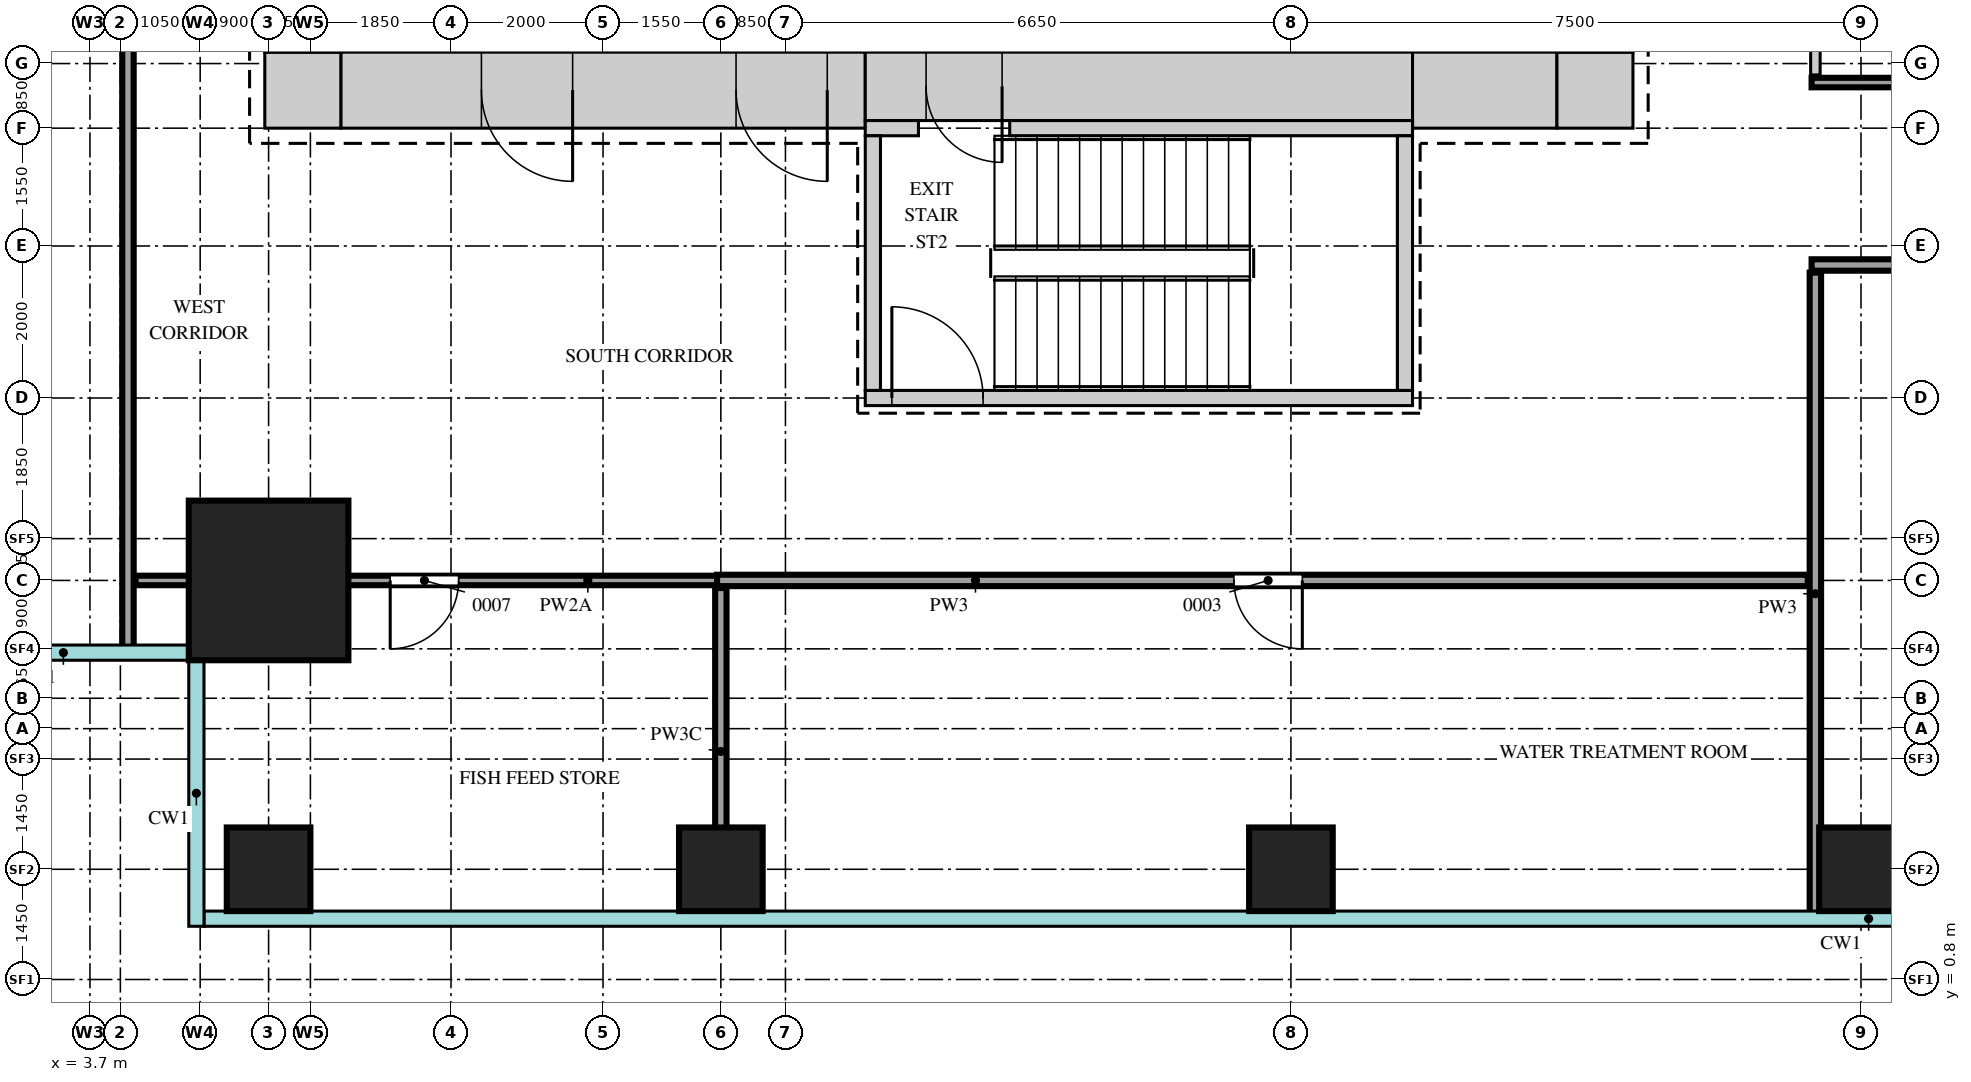
"""IFC4 building model, lengths in metres.
Left out: names, types, materials, properties, quantities, classifications, styles, units other than length and angle.
Written with IfcOpenShell. Run it as: python <this file> out.ifc"""

import sys

from ifc_helpers import new_model, si_unit, direction, frame, frame_2d, origin, origin_2d, place, context, subcontext, project, spatial, rectangle, extrude, source, transform, mapped, element, fill, save


model = new_model("IFC4")
c1 = context("Model", 3, precision=1e-05, world=origin(), true_north=direction((0.0, 1.0)))
c2 = subcontext(c1, "Body", "Model", "MODEL_VIEW")
j1 = project(units=[si_unit("LENGTHUNIT", "METRE"), si_unit("PLANEANGLEUNIT", "RADIAN")], contexts=[c1])
p1 = place(None, origin())
s1 = spatial("IfcSite", under=j1, at=p1, CompositionType="ELEMENT")
p2 = place(p1, origin())
s2 = spatial("IfcBuilding", under=s1, at=p2, CompositionType="ELEMENT")
p3 = place(p2, frame((0.0, 0.0, 145.5)))
s3 = spatial("IfcBuildingStorey", under=s2, at=p3, CompositionType="ELEMENT", Elevation=145.5)
m1 = source(origin(), c2, "Body", "SweptSolid", [
    extrude(rectangle(XDim=6.9, YDim=1.0, at=frame_2d((3.45, 0.0))), origin(), (0.0, 0.0, 1.0), 4.1),
])
p4 = place(p3, frame((7.0, 12.5, 0.0), z_axis=(0.0, 0.0, 1.0), x_axis=(1.0, 0.0, 0.0)))
e1 = element("IfcWall", 1, at=p4, inside=s3, PredefinedType="SHEAR", context=c2, shape_type="MappedRepresentation", body=[
    mapped(m1, transform((0.0, 0.0, 0.0))),
])
m2 = source(origin(), c2, "Body", "SweptSolid", [
    extrude(rectangle(XDim=1.2, YDim=2.1, at=frame_2d((0.6, 1.05))), frame((0.0, 0.51, 0.0), z_axis=(0.0, -1.0, 0.0), x_axis=(1.0, 0.0, 0.0)), (0.0, 0.0, 1.0), 1.02),
])
p5 = place(p4, frame((5.2, 0.0, 0.0)))
e2 = element("IfcOpeningElement", 2, at=p5, cuts=e1, PredefinedType="OPENING", context=c2, shape_type="MappedRepresentation", body=[
    mapped(m2, transform((0.0, 0.0, 0.0))),
])
p6 = place(p4, frame((1.85, 0.0, 0.0)))
e3 = element("IfcOpeningElement", 3, at=p6, cuts=e1, PredefinedType="OPENING", context=c2, shape_type="MappedRepresentation", body=[
    mapped(m2, transform((0.0, 0.0, 0.0))),
])
m3 = source(origin(), c2, "Body", "SweptSolid", [
    extrude(rectangle(XDim=7.2, YDim=0.9, at=frame_2d((3.6, 0.0))), origin(), (0.0, 0.0, 1.0), 4.1),
])
p7 = place(p3, frame((13.9, 12.55, 0.0), z_axis=(0.0, 0.0, 1.0), x_axis=(1.0, 0.0, 0.0)))
e4 = element("IfcWall", 4, at=p7, inside=s3, PredefinedType="SHEAR", context=c2, shape_type="MappedRepresentation", body=[
    mapped(m3, transform((0.0, 0.0, 0.0))),
])
m4 = source(origin(), c2, "Body", "SweptSolid", [
    extrude(rectangle(XDim=1.0, YDim=2.1, at=frame_2d((0.5, 1.05))), frame((0.0, 0.46, 0.0), z_axis=(0.0, -1.0, 0.0), x_axis=(1.0, 0.0, 0.0)), (0.0, 0.0, 1.0), 0.92),
])
p8 = place(p7, frame((0.8, 0.0, 0.0)))
e5 = element("IfcOpeningElement", 5, at=p8, cuts=e4, PredefinedType="OPENING", context=c2, shape_type="MappedRepresentation", body=[
    mapped(m4, transform((0.0, 0.0, 0.0))),
])
m5 = source(origin(), c2, "Body", "SweptSolid", [
    extrude(rectangle(XDim=1.9, YDim=1.0, at=frame_2d((0.95, 0.0))), origin(), (0.0, 0.0, 1.0), 4.1),
])
p9 = place(p3, frame((21.1, 12.5, 0.0), z_axis=(0.0, 0.0, 1.0), x_axis=(1.0, 0.0, 0.0)))
e6 = element("IfcWall", 6, at=p9, inside=s3, PredefinedType="SHEAR", context=c2, shape_type="MappedRepresentation", body=[
    mapped(m5, transform((0.0, 0.0, 0.0))),
])
m6 = source(origin(), c2, "Body", "SweptSolid", [
    extrude(rectangle(XDim=1.0, YDim=1.0, at=frame_2d((0.5, 0.0))), origin(), (0.0, 0.0, 1.0), 4.1),
])
for number, where, z_axis, x_axis in (
    (7, (23.0, 12.5, 0.0), (0.0, 0.0, 1.0), (1.0, 0.0, 0.0)),
    (8, (6.0, 12.5, 0.0), (0.0, 0.0, 1.0), (1.0, 0.0, 0.0)),
):
    element("IfcWall", number, at=place(p3, frame(where, z_axis=z_axis, x_axis=x_axis)), inside=s3, PredefinedType="SHEAR", context=c2, shape_type="MappedRepresentation", body=[
        mapped(m6, transform((0.0, 0.0, 0.0))),
    ])
m7 = source(origin(), c2, "Body", "SweptSolid", [
    extrude(rectangle(XDim=0.7, YDim=0.2, at=frame_2d((0.35, 0.0))), origin(), (0.0, 0.0, 1.0), 4.1),
])
p10 = place(p3, frame((13.9, 12.0, 0.0), z_axis=(0.0, 0.0, 1.0), x_axis=(1.0, 0.0, 0.0)))
e9 = element("IfcWall", 9, at=p10, inside=s3, PredefinedType="SHEAR", context=c2, shape_type="MappedRepresentation", body=[
    mapped(m7, transform((0.0, 0.0, 0.0))),
])
m8 = source(origin(), c2, "Body", "SweptSolid", [
    extrude(rectangle(XDim=5.3, YDim=0.2, at=frame_2d((2.65, 0.0))), origin(), (0.0, 0.0, 1.0), 4.1),
])
p11 = place(p3, frame((15.8, 12.0, 0.0), z_axis=(0.0, 0.0, 1.0), x_axis=(1.0, 0.0, 0.0)))
e10 = element("IfcWall", 10, at=p11, inside=s3, PredefinedType="SHEAR", context=c2, shape_type="MappedRepresentation", body=[
    mapped(m8, transform((0.0, 0.0, 0.0))),
])
m9 = source(origin(), c2, "Body", "SweptSolid", [
    extrude(rectangle(XDim=7.2, YDim=0.2, at=frame_2d((3.6, 0.0))), origin(), (0.0, 0.0, 1.0), 4.1),
])
p12 = place(p3, frame((13.9, 8.45, 0.0), z_axis=(0.0, 0.0, 1.0), x_axis=(1.0, 0.0, 0.0)))
e11 = element("IfcWall", 11, at=p12, inside=s3, PredefinedType="SHEAR", context=c2, shape_type="MappedRepresentation", body=[
    mapped(m9, transform((0.0, 0.0, 0.0))),
])
m10 = source(origin(), c2, "Body", "SweptSolid", [
    extrude(rectangle(XDim=1.2, YDim=2.1, at=frame_2d((0.6, 1.05))), frame((0.0, 0.11, 0.0), z_axis=(0.0, -1.0, 0.0), x_axis=(1.0, 0.0, 0.0)), (0.0, 0.0, 1.0), 0.22),
])
p13 = place(p12, frame((0.35, 0.0, 0.0)))
e12 = element("IfcOpeningElement", 12, at=p13, cuts=e11, PredefinedType="OPENING", context=c2, shape_type="MappedRepresentation", body=[
    mapped(m10, transform((0.0, 0.0, 0.0))),
])
m11 = source(origin(), c2, "Body", "SweptSolid", [
    extrude(rectangle(XDim=3.35, YDim=0.2, at=frame_2d((1.675, 0.0))), origin(), (0.0, 0.0, 1.0), 4.1),
])
for number, where, z_axis, x_axis in (
    (13, (21.0, 8.55, 0.0), (0.0, 0.0, 1.0), (0.0, 1.0, 0.0)),
    (14, (14.0, 8.55, 0.0), (0.0, 0.0, 1.0), (0.0, 1.0, 0.0)),
):
    element("IfcWall", number, at=place(p3, frame(where, z_axis=z_axis, x_axis=x_axis)), inside=s3, PredefinedType="SHEAR", context=c2, shape_type="MappedRepresentation", body=[
        mapped(m11, transform((0.0, 0.0, 0.0))),
    ])
m12 = source(origin(), c2, "Body", "SweptSolid", [
    extrude(rectangle(XDim=2.1, YDim=2.1, at=origin_2d()), origin(), (0.0, 0.0, 1.0), 4.4),
])
p14 = place(p3, frame((6.05, 6.05, 0.0), z_axis=(0.0, 0.0, 1.0), x_axis=(1.0, 0.0, 0.0)))
e15 = element("IfcColumn", 15, at=p14, inside=s3, PredefinedType="COLUMN", context=c2, shape_type="MappedRepresentation", body=[
    mapped(m12, transform((0.0, 0.0, 0.0))),
])
m13 = source(origin(), c2, "Body", "SweptSolid", [
    extrude(rectangle(XDim=1.1, YDim=1.1, at=origin_2d()), origin(), (0.0, 0.0, 1.0), 4.1),
])
for number, where, z_axis, x_axis in (
    (16, (6.05, 2.25, 0.0), (0.0, 0.0, 1.0), (1.0, 0.0, 0.0)),
    (17, (12.0, 2.25, 0.0), (0.0, 0.0, 1.0), (1.0, 0.0, 0.0)),
    (18, (19.5, 2.25, 0.0), (0.0, 0.0, 1.0), (1.0, 0.0, 0.0)),
    (19, (27.0, 2.25, 0.0), (0.0, 0.0, 1.0), (1.0, 0.0, 0.0)),
):
    element("IfcColumn", number, at=place(p3, frame(where, z_axis=z_axis, x_axis=x_axis)), inside=s3, PredefinedType="COLUMN", context=c2, shape_type="MappedRepresentation", body=[
        mapped(m13, transform((0.0, 0.0, 0.0))),
    ])
m14 = source(origin(), c2, "Body", "SweptSolid", [
    extrude(rectangle(XDim=4.3, YDim=0.15, at=frame_2d((2.15, 0.0))), origin(), (0.0, 0.0, 1.0), 3.65),
])
p15 = place(p3, frame((12.0, 1.65, 0.0), z_axis=(0.0, 0.0, 1.0), x_axis=(0.0, 1.0, 0.0)))
e20 = element("IfcWall", 20, at=p15, inside=s3, PredefinedType="PARTITIONING", context=c2, shape_type="MappedRepresentation", body=[
    mapped(m14, transform((0.0, 0.0, 0.0))),
])
m15 = source(origin(), c2, "Body", "SweptSolid", [
    extrude(rectangle(XDim=8.45, YDim=0.15, at=frame_2d((4.225, 0.0))), origin(), (0.0, 0.0, 1.0), 4.2),
])
p16 = place(p3, frame((26.4, 1.65, 0.0), z_axis=(0.0, 0.0, 1.0), x_axis=(0.0, 1.0, 0.0)))
e21 = element("IfcWall", 21, at=p16, inside=s3, PredefinedType="PARTITIONING", context=c2, shape_type="MappedRepresentation", body=[
    mapped(m15, transform((0.0, 0.0, 0.0))),
])
m16 = source(origin(), c2, "Body", "SweptSolid", [
    extrude(rectangle(XDim=43.7, YDim=0.15, at=frame_2d((21.85, 0.0))), origin(), (0.0, 0.0, 1.0), 4.2),
])
p17 = place(p3, frame((4.2, 5.15, 0.0), z_axis=(0.0, 0.0, 1.0), x_axis=(0.0, 1.0, 0.0)))
e22 = element("IfcWall", 22, at=p17, inside=s3, PredefinedType="PARTITIONING", context=c2, shape_type="MappedRepresentation", body=[
    mapped(m16, transform((0.0, 0.0, 0.0))),
])
m17 = source(origin(), c2, "Body", "SweptSolid", [
    extrude(rectangle(XDim=0.9, YDim=2.1, at=frame_2d((0.45, 1.05))), frame((0.0, 0.085, 0.0), z_axis=(0.0, -1.0, 0.0), x_axis=(1.0, 0.0, 0.0)), (0.0, 0.0, 1.0), 0.17),
])
p18 = place(p17, frame((20.1, 0.0, 0.0)))
e23 = element("IfcOpeningElement", 23, at=p18, cuts=e22, PredefinedType="OPENING", context=c2, shape_type="MappedRepresentation", body=[
    mapped(m17, transform((0.0, 0.0, 0.0))),
])
m18 = source(origin(), c2, "Body", "SweptSolid", [
    extrude(rectangle(XDim=7.65, YDim=0.125, at=frame_2d((3.825, 0.0))), origin(), (0.0, 0.0, 1.0), 3.55),
])
p19 = place(p3, frame((4.3, 6.05, 0.0), z_axis=(0.0, 0.0, 1.0), x_axis=(1.0, 0.0, 0.0)))
e24 = element("IfcWall", 24, at=p19, inside=s3, PredefinedType="PARTITIONING", context=c2, shape_type="MappedRepresentation", body=[
    mapped(m18, transform((0.0, 0.0, 0.0))),
])
m19 = source(origin(), c2, "Body", "SweptSolid", [
    extrude(rectangle(XDim=0.9, YDim=2.1, at=frame_2d((0.45, 1.05))), frame((0.0, 0.073, 0.0), z_axis=(0.0, -1.0, 0.0), x_axis=(1.0, 0.0, 0.0)), (0.0, 0.0, 1.0), 0.145),
])
p20 = place(p19, frame((3.35, 0.0, 0.0)))
e25 = element("IfcOpeningElement", 25, at=p20, cuts=e24, PredefinedType="OPENING", context=c2, shape_type="MappedRepresentation", body=[
    mapped(m19, transform((0.0, 0.0, 0.0))),
])
m20 = source(origin(), c2, "Body", "SweptSolid", [
    extrude(rectangle(XDim=14.35, YDim=0.15, at=frame_2d((7.175, 0.0))), origin(), (0.0, 0.0, 1.0), 4.2),
])
p21 = place(p3, frame((11.95, 6.05, 0.0), z_axis=(0.0, 0.0, 1.0), x_axis=(1.0, 0.0, 0.0)))
e26 = element("IfcWall", 26, at=p21, inside=s3, PredefinedType="PARTITIONING", context=c2, shape_type="MappedRepresentation", body=[
    mapped(m20, transform((0.0, 0.0, 0.0))),
])
p22 = place(p21, frame((6.8, 0.0, 0.0)))
e27 = element("IfcOpeningElement", 27, at=p22, cuts=e26, PredefinedType="OPENING", context=c2, shape_type="MappedRepresentation", body=[
    mapped(m17, transform((0.0, 0.0, 0.0))),
])
m21 = source(origin(), c2, "Body", "SweptSolid", [
    extrude(rectangle(XDim=26.0, YDim=0.15, at=frame_2d((13.0, 0.0))), origin(), (0.0, 0.0, 1.0), 4.2),
])
p23 = place(p3, frame((26.35, 10.2, 0.0), z_axis=(0.0, 0.0, 1.0), x_axis=(1.0, 0.0, 0.0)))
e28 = element("IfcWall", 28, at=p23, inside=s3, PredefinedType="PARTITIONING", context=c2, shape_type="MappedRepresentation", body=[
    mapped(m21, transform((0.0, 0.0, 0.0))),
])
m22 = source(origin(), c2, "Body", "SweptSolid", [
    extrude(rectangle(XDim=1.2, YDim=2.1, at=frame_2d((0.6, 1.05))), frame((0.0, 0.085, 0.0), z_axis=(0.0, -1.0, 0.0), x_axis=(1.0, 0.0, 0.0)), (0.0, 0.0, 1.0), 0.17),
])
p24 = place(p23, frame((7.25, 0.0, 0.0)))
e29 = element("IfcOpeningElement", 29, at=p24, cuts=e28, PredefinedType="OPENING", context=c2, shape_type="MappedRepresentation", body=[
    mapped(m22, transform((0.0, 0.0, 0.0))),
])
p25 = place(p23, frame((18.4, 0.0, 0.0)))
e30 = element("IfcOpeningElement", 30, at=p25, cuts=e28, PredefinedType="OPENING", context=c2, shape_type="MappedRepresentation", body=[
    mapped(m17, transform((0.0, 0.0, 0.0))),
])
m23 = source(origin(), c2, "Body", "SweptSolid", [
    extrude(rectangle(XDim=17.7, YDim=0.125, at=frame_2d((8.85, 0.0))), origin(), (0.0, 0.0, 1.0), 4.2),
])
p26 = place(p3, frame((26.35, 12.6, 0.0), z_axis=(0.0, 0.0, 1.0), x_axis=(1.0, 0.0, 0.0)))
e31 = element("IfcWall", 31, at=p26, inside=s3, PredefinedType="PARTITIONING", context=c2, shape_type="MappedRepresentation", body=[
    mapped(m23, transform((0.0, 0.0, 0.0))),
])
m24 = source(origin(), c2, "Body", "SweptSolid", [
    extrude(rectangle(XDim=23.2, YDim=0.125, at=frame_2d((11.6, 0.0))), origin(), (0.0, 0.0, 1.0), 4.2),
])
p27 = place(p3, frame((26.4, 12.7, 0.0), z_axis=(0.0, 0.0, 1.0), x_axis=(0.0, 1.0, 0.0)))
e32 = element("IfcWall", 32, at=p27, inside=s3, PredefinedType="PARTITIONING", context=c2, shape_type="MappedRepresentation", body=[
    mapped(m24, transform((0.0, 0.0, 0.0))),
])
p28 = place(p27, frame((2.15, 0.0, 0.0)))
e33 = element("IfcOpeningElement", 33, at=p28, cuts=e32, PredefinedType="OPENING", context=c2, shape_type="MappedRepresentation", body=[
    mapped(m19, transform((0.0, 0.0, 0.0))),
])
m25 = source(origin(), c2, "Body", "SweptSolid", [
    extrude(rectangle(XDim=1.2, YDim=2.1, at=frame_2d((0.6, 1.05))), frame((0.0, 0.45, 0.0), z_axis=(0.0, -1.0, 0.0), x_axis=(1.0, 0.0, 0.0)), (0.0, 0.0, 1.0), 0.9),
])
p29 = place(p5, origin())
e34 = element("IfcDoor", 34, at=p29, inside=s3, OperationType="SINGLE_SWING_RIGHT", PredefinedType="DOOR", context=c2, shape_type="MappedRepresentation", body=[
    mapped(m25, transform((0.0, 0.0, 0.0))),
])
fill(e2, e34)
p30 = place(p6, origin())
e35 = element("IfcDoor", 35, at=p30, inside=s3, OperationType="SINGLE_SWING_RIGHT", PredefinedType="DOOR", context=c2, shape_type="MappedRepresentation", body=[
    mapped(m25, transform((0.0, 0.0, 0.0))),
])
fill(e3, e35)
m26 = source(origin(), c2, "Body", "SweptSolid", [
    extrude(rectangle(XDim=1.0, YDim=2.1, at=frame_2d((0.5, 1.05))), frame((0.0, 0.4, 0.0), z_axis=(0.0, -1.0, 0.0), x_axis=(1.0, 0.0, 0.0)), (0.0, 0.0, 1.0), 0.8),
])
p31 = place(p8, origin())
e36 = element("IfcDoor", 36, at=p31, inside=s3, OperationType="SINGLE_SWING_RIGHT", PredefinedType="DOOR", context=c2, shape_type="MappedRepresentation", body=[
    mapped(m26, transform((0.0, 0.0, 0.0))),
])
fill(e5, e36)
m27 = source(origin(), c2, "Body", "SweptSolid", [
    extrude(rectangle(XDim=0.9, YDim=2.1, at=frame_2d((0.45, 1.05))), frame((0.0, 0.025, 0.0), z_axis=(0.0, -1.0, 0.0), x_axis=(1.0, 0.0, 0.0)), (0.0, 0.0, 1.0), 0.05),
])
p32 = place(p20, origin())
e37 = element("IfcDoor", 37, at=p32, inside=s3, OperationType="SINGLE_SWING_LEFT", PredefinedType="DOOR", context=c2, shape_type="MappedRepresentation", body=[
    mapped(m27, transform((0.0, 0.0, 0.0))),
])
fill(e25, e37)
p33 = place(p22, origin())
e38 = element("IfcDoor", 38, at=p33, inside=s3, OperationType="SINGLE_SWING_RIGHT", PredefinedType="DOOR", context=c2, shape_type="MappedRepresentation", body=[
    mapped(m27, transform((0.0, 0.0, 0.0))),
])
fill(e27, e38)
m28 = source(origin(), c2, "Body", "SweptSolid", [
    extrude(rectangle(XDim=1.2, YDim=2.1, at=frame_2d((0.6, 1.05))), frame((0.0, 0.025, 0.0), z_axis=(0.0, -1.0, 0.0), x_axis=(1.0, 0.0, 0.0)), (0.0, 0.0, 1.0), 0.05),
])
p34 = place(p13, origin())
e39 = element("IfcDoor", 39, at=p34, inside=s3, OperationType="SINGLE_SWING_RIGHT", PredefinedType="DOOR", context=c2, shape_type="MappedRepresentation", body=[
    mapped(m28, transform((0.0, 0.0, 0.0))),
])
fill(e12, e39)
save(model, sys.argv[1])
